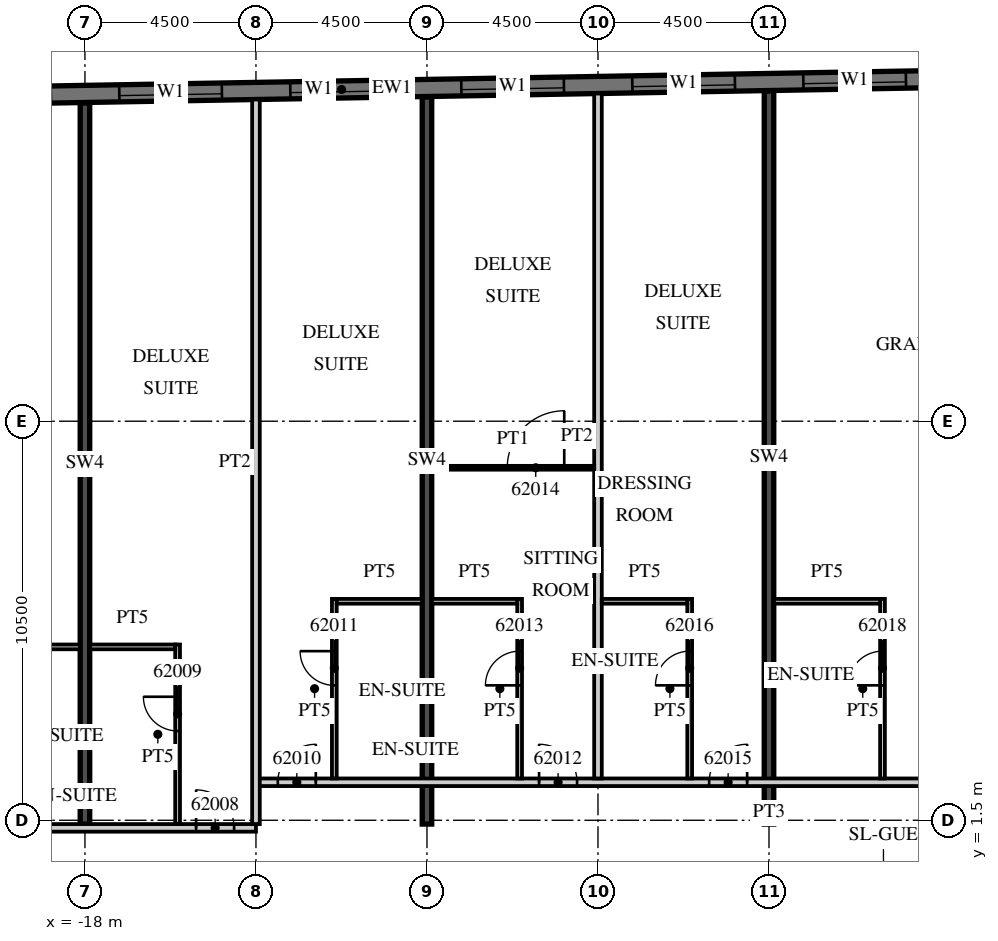
"""IFC4 building model, lengths in metres.
Left out: names, types, materials, properties, quantities, classifications, styles, units other than length and angle.
Written with IfcOpenShell. Run it as: python <this file> out.ifc"""

import sys

from ifc_helpers import new_model, si_unit, direction, frame, frame_2d, origin, place, context, subcontext, project, spatial, rectangle, extrude, element, fill, save


model = new_model("IFC4")
c1 = context("Model", 3, precision=1e-05, world=origin(), true_north=direction((0.0, 1.0)))
c2 = subcontext(c1, "Body", "Model", "MODEL_VIEW")
j1 = project(units=[si_unit("LENGTHUNIT", "METRE"), si_unit("PLANEANGLEUNIT", "RADIAN")], contexts=[c1])
p1 = place(None, origin())
s1 = spatial("IfcSite", under=j1, at=p1, CompositionType="ELEMENT")
p2 = place(p1, origin())
s2 = spatial("IfcBuilding", under=s1, at=p2, CompositionType="ELEMENT")
p3 = place(p2, frame((0.0, 0.0, 250.7)))
s3 = spatial("IfcBuildingStorey", under=s2, at=p3, CompositionType="ELEMENT", Elevation=250.7)
p4 = place(p3, frame((-18.0, 1.4, 0.0), z_axis=(0.0, 0.0, 1.0), x_axis=(0.0, 1.0, 0.0)))
e1 = element("IfcWall", 1, at=p4, inside=s3, PredefinedType="SHEAR", context=c2, shape_type="SweptSolid", body=[
    extrude(rectangle(XDim=18.974, YDim=0.25, at=frame_2d((9.487, 0.0))), origin(), (0.0, 0.0, 1.0), 3.3),
])
p5 = place(p3, frame((-9.0, 1.4, 0.0), z_axis=(0.0, 0.0, 1.0), x_axis=(0.0, 1.0, 0.0)))
e2 = element("IfcWall", 2, at=p5, inside=s3, PredefinedType="SHEAR", context=c2, shape_type="SweptSolid", body=[
    extrude(rectangle(XDim=19.132, YDim=0.25, at=frame_2d((9.566, 0.0))), origin(), (0.0, 0.0, 1.0), 3.3),
])
p6 = place(p3, frame((0.0, 1.4, 0.0), z_axis=(0.0, 0.0, 1.0), x_axis=(0.0, 1.0, 0.0)))
e3 = element("IfcWall", 3, at=p6, inside=s3, PredefinedType="SHEAR", context=c2, shape_type="SweptSolid", body=[
    extrude(rectangle(XDim=19.289, YDim=0.25, at=frame_2d((9.644, 0.0))), origin(), (0.0, 0.0, 1.0), 3.3),
])
p7 = place(p3, frame((13.504, 21.161, 0.0), z_axis=(0.0, 0.0, 1.0), x_axis=(-0.999847763257, -0.017448504532, 0.0)))
e4 = element("IfcWall", 4, at=p7, inside=s3, PredefinedType="SOLIDWALL", context=c2, shape_type="SweptSolid", body=[
    extrude(rectangle(XDim=46.859, YDim=0.45, at=frame_2d((23.43, 0.0))), origin(), (0.0, 0.0, 1.0), 3.02),
])
p8 = place(p7, frame((0.9, 0.0, 0.45)))
e5 = element("IfcOpeningElement", 5, at=p8, cuts=e4, PredefinedType="OPENING", context=c2, shape_type="SweptSolid", body=[
    extrude(rectangle(XDim=2.7, YDim=2.25, at=frame_2d((1.35, 1.125))), frame((0.0, 0.235, 0.0), z_axis=(0.0, -1.0, 0.0), x_axis=(1.0, 0.0, 0.0)), (0.0, 0.0, 1.0), 0.47),
])
p9 = place(p7, frame((5.401, 0.0, 0.45)))
e6 = element("IfcOpeningElement", 6, at=p9, cuts=e4, PredefinedType="OPENING", context=c2, shape_type="SweptSolid", body=[
    extrude(rectangle(XDim=2.7, YDim=2.25, at=frame_2d((1.35, 1.125))), frame((0.0, 0.235, 0.0), z_axis=(0.0, -1.0, 0.0), x_axis=(1.0, 0.0, 0.0)), (0.0, 0.0, 1.0), 0.47),
])
p10 = place(p7, frame((9.902, 0.0, 0.45)))
e7 = element("IfcOpeningElement", 7, at=p10, cuts=e4, PredefinedType="OPENING", context=c2, shape_type="SweptSolid", body=[
    extrude(rectangle(XDim=2.7, YDim=2.25, at=frame_2d((1.35, 1.125))), frame((0.0, 0.235, 0.0), z_axis=(0.0, -1.0, 0.0), x_axis=(1.0, 0.0, 0.0)), (0.0, 0.0, 1.0), 0.47),
])
p11 = place(p7, frame((14.402, 0.0, 0.45)))
e8 = element("IfcOpeningElement", 8, at=p11, cuts=e4, PredefinedType="OPENING", context=c2, shape_type="SweptSolid", body=[
    extrude(rectangle(XDim=2.7, YDim=2.25, at=frame_2d((1.35, 1.125))), frame((0.0, 0.235, 0.0), z_axis=(0.0, -1.0, 0.0), x_axis=(1.0, 0.0, 0.0)), (0.0, 0.0, 1.0), 0.47),
])
p12 = place(p7, frame((18.903, 0.0, 0.45)))
e9 = element("IfcOpeningElement", 9, at=p12, cuts=e4, PredefinedType="OPENING", context=c2, shape_type="SweptSolid", body=[
    extrude(rectangle(XDim=2.7, YDim=2.25, at=frame_2d((1.35, 1.125))), frame((0.0, 0.235, 0.0), z_axis=(0.0, -1.0, 0.0), x_axis=(1.0, 0.0, 0.0)), (0.0, 0.0, 1.0), 0.47),
])
p13 = place(p7, frame((23.404, 0.0, 0.45)))
e10 = element("IfcOpeningElement", 10, at=p13, cuts=e4, PredefinedType="OPENING", context=c2, shape_type="SweptSolid", body=[
    extrude(rectangle(XDim=2.7, YDim=2.25, at=frame_2d((1.35, 1.125))), frame((0.0, 0.235, 0.0), z_axis=(0.0, -1.0, 0.0), x_axis=(1.0, 0.0, 0.0)), (0.0, 0.0, 1.0), 0.47),
])
p14 = place(p7, frame((27.904, 0.0, 0.45)))
e11 = element("IfcOpeningElement", 11, at=p14, cuts=e4, PredefinedType="OPENING", context=c2, shape_type="SweptSolid", body=[
    extrude(rectangle(XDim=2.7, YDim=2.25, at=frame_2d((1.35, 1.125))), frame((0.0, 0.235, 0.0), z_axis=(0.0, -1.0, 0.0), x_axis=(1.0, 0.0, 0.0)), (0.0, 0.0, 1.0), 0.47),
])
p15 = place(p7, frame((32.405, 0.0, 0.45)))
e12 = element("IfcOpeningElement", 12, at=p15, cuts=e4, PredefinedType="OPENING", context=c2, shape_type="SweptSolid", body=[
    extrude(rectangle(XDim=2.7, YDim=2.25, at=frame_2d((1.35, 1.125))), frame((0.0, 0.235, 0.0), z_axis=(0.0, -1.0, 0.0), x_axis=(1.0, 0.0, 0.0)), (0.0, 0.0, 1.0), 0.47),
])
p16 = place(p7, frame((36.906, 0.0, 0.45)))
e13 = element("IfcOpeningElement", 13, at=p16, cuts=e4, PredefinedType="OPENING", context=c2, shape_type="SweptSolid", body=[
    extrude(rectangle(XDim=2.7, YDim=2.25, at=frame_2d((1.35, 1.125))), frame((0.0, 0.235, 0.0), z_axis=(0.0, -1.0, 0.0), x_axis=(1.0, 0.0, 0.0)), (0.0, 0.0, 1.0), 0.47),
])
p17 = place(p7, frame((41.406, 0.0, 0.45)))
e14 = element("IfcOpeningElement", 14, at=p17, cuts=e4, PredefinedType="OPENING", context=c2, shape_type="SweptSolid", body=[
    extrude(rectangle(XDim=2.7, YDim=2.25, at=frame_2d((1.35, 1.125))), frame((0.0, 0.235, 0.0), z_axis=(0.0, -1.0, 0.0), x_axis=(1.0, 0.0, 0.0)), (0.0, 0.0, 1.0), 0.47),
])
p18 = place(p3, frame((-36.566, 1.3, 0.0), z_axis=(0.0, 0.0, 1.0), x_axis=(1.0, 0.0, 0.0)))
e15 = element("IfcWall", 15, at=p18, inside=s3, PredefinedType="PARTITIONING", context=c2, shape_type="SweptSolid", body=[
    extrude(rectangle(XDim=23.066, YDim=0.2, at=frame_2d((11.533, 0.0))), origin(), (0.0, 0.0, 1.0), 3.02),
])
p19 = place(p18, frame((5.929, 0.0, 0.0)))
e16 = element("IfcOpeningElement", 16, at=p19, cuts=e15, PredefinedType="OPENING", context=c2, shape_type="SweptSolid", body=[
    extrude(rectangle(XDim=1.2, YDim=2.1, at=frame_2d((0.6, 1.05))), frame((0.0, 0.11, 0.0), z_axis=(0.0, -1.0, 0.0), x_axis=(1.0, 0.0, 0.0)), (0.0, 0.0, 1.0), 0.22),
])
p20 = place(p18, frame((12.516, 0.0, 0.0)))
e17 = element("IfcOpeningElement", 17, at=p20, cuts=e15, PredefinedType="OPENING", context=c2, shape_type="SweptSolid", body=[
    extrude(rectangle(XDim=1.0, YDim=2.1, at=frame_2d((0.5, 1.05))), frame((0.0, 0.11, 0.0), z_axis=(0.0, -1.0, 0.0), x_axis=(1.0, 0.0, 0.0)), (0.0, 0.0, 1.0), 0.22),
])
p21 = place(p18, frame((14.616, 0.0, 0.0)))
e18 = element("IfcOpeningElement", 18, at=p21, cuts=e15, PredefinedType="OPENING", context=c2, shape_type="SweptSolid", body=[
    extrude(rectangle(XDim=1.0, YDim=2.1, at=frame_2d((0.5, 1.05))), frame((0.0, 0.11, 0.0), z_axis=(0.0, -1.0, 0.0), x_axis=(1.0, 0.0, 0.0)), (0.0, 0.0, 1.0), 0.22),
])
p22 = place(p18, frame((21.491, 0.0, 0.0)))
e19 = element("IfcOpeningElement", 19, at=p22, cuts=e15, PredefinedType="OPENING", context=c2, shape_type="SweptSolid", body=[
    extrude(rectangle(XDim=1.0, YDim=2.1, at=frame_2d((0.5, 1.05))), frame((0.0, 0.11, 0.0), z_axis=(0.0, -1.0, 0.0), x_axis=(1.0, 0.0, 0.0)), (0.0, 0.0, 1.0), 0.22),
])
p23 = place(p3, frame((-13.5, 2.5, 0.0), z_axis=(0.0, 0.0, 1.0), x_axis=(1.0, 0.0, 0.0)))
e20 = element("IfcWall", 20, at=p23, inside=s3, PredefinedType="PARTITIONING", context=c2, shape_type="SweptSolid", body=[
    extrude(rectangle(XDim=27.0, YDim=0.2, at=frame_2d((13.5, 0.0))), origin(), (0.0, 0.0, 1.0), 3.02),
])
p24 = place(p23, frame((0.575, 0.0, 0.0)))
e21 = element("IfcOpeningElement", 21, at=p24, cuts=e20, PredefinedType="OPENING", context=c2, shape_type="SweptSolid", body=[
    extrude(rectangle(XDim=1.0, YDim=2.1, at=frame_2d((0.5, 1.05))), frame((0.0, 0.11, 0.0), z_axis=(0.0, -1.0, 0.0), x_axis=(1.0, 0.0, 0.0)), (0.0, 0.0, 1.0), 0.22),
])
p25 = place(p23, frame((7.45, 0.0, 0.0)))
e22 = element("IfcOpeningElement", 22, at=p25, cuts=e20, PredefinedType="OPENING", context=c2, shape_type="SweptSolid", body=[
    extrude(rectangle(XDim=1.0, YDim=2.1, at=frame_2d((0.5, 1.05))), frame((0.0, 0.11, 0.0), z_axis=(0.0, -1.0, 0.0), x_axis=(1.0, 0.0, 0.0)), (0.0, 0.0, 1.0), 0.22),
])
p26 = place(p23, frame((11.925, 0.0, 0.0)))
e23 = element("IfcOpeningElement", 23, at=p26, cuts=e20, PredefinedType="OPENING", context=c2, shape_type="SweptSolid", body=[
    extrude(rectangle(XDim=1.0, YDim=2.1, at=frame_2d((0.5, 1.05))), frame((0.0, 0.11, 0.0), z_axis=(0.0, -1.0, 0.0), x_axis=(1.0, 0.0, 0.0)), (0.0, 0.0, 1.0), 0.22),
])
p27 = place(p23, frame((18.862, 0.0, 0.0)))
e24 = element("IfcOpeningElement", 24, at=p27, cuts=e20, PredefinedType="OPENING", context=c2, shape_type="SweptSolid", body=[
    extrude(rectangle(XDim=1.2, YDim=2.1, at=frame_2d((0.6, 1.05))), frame((0.0, 0.11, 0.0), z_axis=(0.0, -1.0, 0.0), x_axis=(1.0, 0.0, 0.0)), (0.0, 0.0, 1.0), 0.22),
])
p28 = place(p23, frame((23.075, 0.0, 0.0)))
e25 = element("IfcOpeningElement", 25, at=p28, cuts=e20, PredefinedType="OPENING", context=c2, shape_type="SweptSolid", body=[
    extrude(rectangle(XDim=1.0, YDim=2.1, at=frame_2d((0.5, 1.05))), frame((0.0, 0.11, 0.0), z_axis=(0.0, -1.0, 0.0), x_axis=(1.0, 0.0, 0.0)), (0.0, 0.0, 1.0), 0.22),
])
p29 = place(p3, frame((-20.375, 6.062, 0.0), z_axis=(0.0, 0.0, 1.0), x_axis=(1.0, 0.0, 0.0)))
e26 = element("IfcWall", 26, at=p29, inside=s3, PredefinedType="PARTITIONING", context=c2, shape_type="SweptSolid", body=[
    extrude(rectangle(XDim=2.25, YDim=0.125, at=frame_2d((1.125, 0.0))), origin(), (0.0, 0.0, 1.0), 3.02),
])
p30 = place(p3, frame((-13.5, 1.4, 0.0), z_axis=(0.0, 0.0, 1.0), x_axis=(0.0, 1.0, 0.0)))
e27 = element("IfcWall", 27, at=p30, inside=s3, PredefinedType="PARTITIONING", context=c2, shape_type="SweptSolid", body=[
    extrude(rectangle(XDim=19.065, YDim=0.2, at=frame_2d((9.533, 0.0))), origin(), (0.0, 0.0, 1.0), 3.02),
])
p31 = place(p3, frame((-15.562, 1.4, 0.0), z_axis=(0.0, 0.0, 1.0), x_axis=(0.0, 1.0, 0.0)))
e28 = element("IfcWall", 28, at=p31, inside=s3, PredefinedType="PARTITIONING", context=c2, shape_type="SweptSolid", body=[
    extrude(rectangle(XDim=4.725, YDim=0.125, at=frame_2d((2.363, 0.0))), origin(), (0.0, 0.0, 1.0), 3.02),
])
p32 = place(p31, frame((2.45, 0.0, 0.0)))
e29 = element("IfcOpeningElement", 29, at=p32, cuts=e28, PredefinedType="OPENING", context=c2, shape_type="SweptSolid", body=[
    extrude(rectangle(XDim=0.9, YDim=2.1, at=frame_2d((0.45, 1.05))), frame((0.0, 0.073, 0.0), z_axis=(0.0, -1.0, 0.0), x_axis=(1.0, 0.0, 0.0)), (0.0, 0.0, 1.0), 0.145),
])
p33 = place(p3, frame((-17.875, 6.062, 0.0), z_axis=(0.0, 0.0, 1.0), x_axis=(1.0, 0.0, 0.0)))
e30 = element("IfcWall", 30, at=p33, inside=s3, PredefinedType="PARTITIONING", context=c2, shape_type="SweptSolid", body=[
    extrude(rectangle(XDim=2.25, YDim=0.125, at=frame_2d((1.125, 0.0))), origin(), (0.0, 0.0, 1.0), 3.02),
])
p34 = place(p3, frame((-11.438, 2.6, 0.0), z_axis=(0.0, 0.0, 1.0), x_axis=(0.0, 1.0, 0.0)))
e31 = element("IfcWall", 31, at=p34, inside=s3, PredefinedType="PARTITIONING", context=c2, shape_type="SweptSolid", body=[
    extrude(rectangle(XDim=4.725, YDim=0.125, at=frame_2d((2.362, 0.0))), origin(), (0.0, 0.0, 1.0), 3.02),
])
p35 = place(p34, frame((2.45, 0.0, 0.0)))
e32 = element("IfcOpeningElement", 32, at=p35, cuts=e31, PredefinedType="OPENING", context=c2, shape_type="SweptSolid", body=[
    extrude(rectangle(XDim=0.9, YDim=2.1, at=frame_2d((0.45, 1.05))), frame((0.0, 0.073, 0.0), z_axis=(0.0, -1.0, 0.0), x_axis=(1.0, 0.0, 0.0)), (0.0, 0.0, 1.0), 0.145),
])
p36 = place(p3, frame((-11.375, 7.262, 0.0), z_axis=(0.0, 0.0, 1.0), x_axis=(1.0, 0.0, 0.0)))
e33 = element("IfcWall", 33, at=p36, inside=s3, PredefinedType="PARTITIONING", context=c2, shape_type="SweptSolid", body=[
    extrude(rectangle(XDim=2.25, YDim=0.125, at=frame_2d((1.125, 0.0))), origin(), (0.0, 0.0, 1.0), 3.02),
])
p37 = place(p3, frame((-4.5, 2.6, 0.0), z_axis=(0.0, 0.0, 1.0), x_axis=(0.0, 1.0, 0.0)))
e34 = element("IfcWall", 34, at=p37, inside=s3, PredefinedType="PARTITIONING", context=c2, shape_type="SweptSolid", body=[
    extrude(rectangle(XDim=18.022, YDim=0.2, at=frame_2d((9.011, 0.0))), origin(), (0.0, 0.0, 1.0), 3.02),
])
p38 = place(p3, frame((-6.562, 2.6, 0.0), z_axis=(0.0, 0.0, 1.0), x_axis=(0.0, 1.0, 0.0)))
e35 = element("IfcWall", 35, at=p38, inside=s3, PredefinedType="PARTITIONING", context=c2, shape_type="SweptSolid", body=[
    extrude(rectangle(XDim=4.725, YDim=0.125, at=frame_2d((2.362, 0.0))), origin(), (0.0, 0.0, 1.0), 3.02),
])
p39 = place(p38, frame((2.45, 0.0, 0.0)))
e36 = element("IfcOpeningElement", 36, at=p39, cuts=e35, PredefinedType="OPENING", context=c2, shape_type="SweptSolid", body=[
    extrude(rectangle(XDim=0.9, YDim=2.1, at=frame_2d((0.45, 1.05))), frame((0.0, 0.073, 0.0), z_axis=(0.0, -1.0, 0.0), x_axis=(1.0, 0.0, 0.0)), (0.0, 0.0, 1.0), 0.145),
])
p40 = place(p3, frame((-8.875, 7.262, 0.0), z_axis=(0.0, 0.0, 1.0), x_axis=(1.0, 0.0, 0.0)))
e37 = element("IfcWall", 37, at=p40, inside=s3, PredefinedType="PARTITIONING", context=c2, shape_type="SweptSolid", body=[
    extrude(rectangle(XDim=2.25, YDim=0.125, at=frame_2d((1.125, 0.0))), origin(), (0.0, 0.0, 1.0), 3.02),
])
p41 = place(p3, frame((-8.875, 10.775, 0.0), z_axis=(0.0, 0.0, 1.0), x_axis=(1.0, 0.0, 0.0)))
e38 = element("IfcWall", 38, at=p41, inside=s3, PredefinedType="PARTITIONING", context=c2, shape_type="SweptSolid", body=[
    extrude(rectangle(XDim=4.275, YDim=0.1, at=frame_2d((2.137, 0.0))), origin(), (0.0, 0.0, 1.0), 3.02),
])
p42 = place(p41, frame((1.987, 0.0, 0.0)))
e39 = element("IfcOpeningElement", 39, at=p42, cuts=e38, PredefinedType="OPENING", context=c2, shape_type="SweptSolid", body=[
    extrude(rectangle(XDim=1.5, YDim=2.1, at=frame_2d((0.75, 1.05))), frame((0.0, 0.06, 0.0), z_axis=(0.0, -1.0, 0.0), x_axis=(1.0, 0.0, 0.0)), (0.0, 0.0, 1.0), 0.12),
])
p43 = place(p3, frame((-2.087, 2.6, 0.0), z_axis=(0.0, 0.0, 1.0), x_axis=(0.0, 1.0, 0.0)))
e40 = element("IfcWall", 40, at=p43, inside=s3, PredefinedType="PARTITIONING", context=c2, shape_type="SweptSolid", body=[
    extrude(rectangle(XDim=4.725, YDim=0.125, at=frame_2d((2.362, 0.0))), origin(), (0.0, 0.0, 1.0), 3.02),
])
p44 = place(p43, frame((2.45, 0.0, 0.0)))
e41 = element("IfcOpeningElement", 41, at=p44, cuts=e40, PredefinedType="OPENING", context=c2, shape_type="SweptSolid", body=[
    extrude(rectangle(XDim=0.9, YDim=2.1, at=frame_2d((0.45, 1.05))), frame((0.0, 0.073, 0.0), z_axis=(0.0, -1.0, 0.0), x_axis=(1.0, 0.0, 0.0)), (0.0, 0.0, 1.0), 0.145),
])
p45 = place(p3, frame((-4.4, 7.262, 0.0), z_axis=(0.0, 0.0, 1.0), x_axis=(1.0, 0.0, 0.0)))
e42 = element("IfcWall", 42, at=p45, inside=s3, PredefinedType="PARTITIONING", context=c2, shape_type="SweptSolid", body=[
    extrude(rectangle(XDim=2.25, YDim=0.125, at=frame_2d((1.125, 0.0))), origin(), (0.0, 0.0, 1.0), 3.02),
])
p46 = place(p3, frame((2.987, 2.6, 0.0), z_axis=(0.0, 0.0, 1.0), x_axis=(0.0, 1.0, 0.0)))
e43 = element("IfcWall", 43, at=p46, inside=s3, PredefinedType="PARTITIONING", context=c2, shape_type="SweptSolid", body=[
    extrude(rectangle(XDim=4.725, YDim=0.125, at=frame_2d((2.362, 0.0))), origin(), (0.0, 0.0, 1.0), 3.02),
])
p47 = place(p46, frame((2.45, 0.0, 0.0)))
e44 = element("IfcOpeningElement", 44, at=p47, cuts=e43, PredefinedType="OPENING", context=c2, shape_type="SweptSolid", body=[
    extrude(rectangle(XDim=0.9, YDim=2.1, at=frame_2d((0.45, 1.05))), frame((0.0, 0.073, 0.0), z_axis=(0.0, -1.0, 0.0), x_axis=(1.0, 0.0, 0.0)), (0.0, 0.0, 1.0), 0.145),
])
p48 = place(p3, frame((0.125, 7.262, 0.0), z_axis=(0.0, 0.0, 1.0), x_axis=(1.0, 0.0, 0.0)))
e45 = element("IfcWall", 45, at=p48, inside=s3, PredefinedType="PARTITIONING", context=c2, shape_type="SweptSolid", body=[
    extrude(rectangle(XDim=2.8, YDim=0.125, at=frame_2d((1.4, 0.0))), origin(), (0.0, 0.0, 1.0), 3.02),
])
p49 = place(p10, origin())
e46 = element("IfcWindow", 46, at=p49, inside=s3, PartitioningType="SINGLE_PANEL", PredefinedType="WINDOW", context=c2, shape_type="SweptSolid", body=[
    extrude(rectangle(XDim=2.7, YDim=2.25, at=frame_2d((1.35, 1.125))), frame((0.0, 0.09, 0.0), z_axis=(0.0, -1.0, 0.0), x_axis=(1.0, 0.0, 0.0)), (0.0, 0.0, 1.0), 0.06),
])
fill(e7, e46)
p50 = place(p11, origin())
e47 = element("IfcWindow", 47, at=p50, inside=s3, PartitioningType="SINGLE_PANEL", PredefinedType="WINDOW", context=c2, shape_type="SweptSolid", body=[
    extrude(rectangle(XDim=2.7, YDim=2.25, at=frame_2d((1.35, 1.125))), frame((0.0, 0.09, 0.0), z_axis=(0.0, -1.0, 0.0), x_axis=(1.0, 0.0, 0.0)), (0.0, 0.0, 1.0), 0.06),
])
fill(e8, e47)
p51 = place(p12, origin())
e48 = element("IfcWindow", 48, at=p51, inside=s3, PartitioningType="SINGLE_PANEL", PredefinedType="WINDOW", context=c2, shape_type="SweptSolid", body=[
    extrude(rectangle(XDim=2.7, YDim=2.25, at=frame_2d((1.35, 1.125))), frame((0.0, 0.09, 0.0), z_axis=(0.0, -1.0, 0.0), x_axis=(1.0, 0.0, 0.0)), (0.0, 0.0, 1.0), 0.06),
])
fill(e9, e48)
p52 = place(p13, origin())
e49 = element("IfcWindow", 49, at=p52, inside=s3, PartitioningType="SINGLE_PANEL", PredefinedType="WINDOW", context=c2, shape_type="SweptSolid", body=[
    extrude(rectangle(XDim=2.7, YDim=2.25, at=frame_2d((1.35, 1.125))), frame((0.0, 0.09, 0.0), z_axis=(0.0, -1.0, 0.0), x_axis=(1.0, 0.0, 0.0)), (0.0, 0.0, 1.0), 0.06),
])
fill(e10, e49)
p53 = place(p14, origin())
e50 = element("IfcWindow", 50, at=p53, inside=s3, PartitioningType="SINGLE_PANEL", PredefinedType="WINDOW", context=c2, shape_type="SweptSolid", body=[
    extrude(rectangle(XDim=2.7, YDim=2.25, at=frame_2d((1.35, 1.125))), frame((0.0, 0.09, 0.0), z_axis=(0.0, -1.0, 0.0), x_axis=(1.0, 0.0, 0.0)), (0.0, 0.0, 1.0), 0.06),
])
fill(e11, e50)
p54 = place(p22, origin())
e51 = element("IfcDoor", 51, at=p54, inside=s3, OperationType="SINGLE_SWING_LEFT", PredefinedType="DOOR", context=c2, shape_type="SweptSolid", body=[
    extrude(rectangle(XDim=1.0, YDim=2.1, at=frame_2d((0.5, 1.05))), frame((0.0, 0.025, 0.0), z_axis=(0.0, -1.0, 0.0), x_axis=(1.0, 0.0, 0.0)), (0.0, 0.0, 1.0), 0.05),
])
fill(e19, e51)
p55 = place(p32, origin())
e52 = element("IfcDoor", 52, at=p55, inside=s3, OperationType="SINGLE_SWING_RIGHT", PredefinedType="DOOR", context=c2, shape_type="SweptSolid", body=[
    extrude(rectangle(XDim=0.9, YDim=2.1, at=frame_2d((0.45, 1.05))), frame((0.0, 0.025, 0.0), z_axis=(0.0, -1.0, 0.0), x_axis=(1.0, 0.0, 0.0)), (0.0, 0.0, 1.0), 0.05),
])
fill(e29, e52)
p56 = place(p24, origin())
e53 = element("IfcDoor", 53, at=p56, inside=s3, OperationType="SINGLE_SWING_RIGHT", PredefinedType="DOOR", context=c2, shape_type="SweptSolid", body=[
    extrude(rectangle(XDim=1.0, YDim=2.1, at=frame_2d((0.5, 1.05))), frame((0.0, 0.025, 0.0), z_axis=(0.0, -1.0, 0.0), x_axis=(1.0, 0.0, 0.0)), (0.0, 0.0, 1.0), 0.05),
])
fill(e21, e53)
p57 = place(p35, origin())
e54 = element("IfcDoor", 54, at=p57, inside=s3, OperationType="SINGLE_SWING_RIGHT", PredefinedType="DOOR", context=c2, shape_type="SweptSolid", body=[
    extrude(rectangle(XDim=0.9, YDim=2.1, at=frame_2d((0.45, 1.05))), frame((0.0, 0.025, 0.0), z_axis=(0.0, -1.0, 0.0), x_axis=(1.0, 0.0, 0.0)), (0.0, 0.0, 1.0), 0.05),
])
fill(e32, e54)
p58 = place(p25, origin())
e55 = element("IfcDoor", 55, at=p58, inside=s3, OperationType="SINGLE_SWING_LEFT", PredefinedType="DOOR", context=c2, shape_type="SweptSolid", body=[
    extrude(rectangle(XDim=1.0, YDim=2.1, at=frame_2d((0.5, 1.05))), frame((0.0, 0.025, 0.0), z_axis=(0.0, -1.0, 0.0), x_axis=(1.0, 0.0, 0.0)), (0.0, 0.0, 1.0), 0.05),
])
fill(e22, e55)
p59 = place(p39, origin())
e56 = element("IfcDoor", 56, at=p59, inside=s3, OperationType="SINGLE_SWING_LEFT", PredefinedType="DOOR", context=c2, shape_type="SweptSolid", body=[
    extrude(rectangle(XDim=0.9, YDim=2.1, at=frame_2d((0.45, 1.05))), frame((0.0, 0.025, 0.0), z_axis=(0.0, -1.0, 0.0), x_axis=(1.0, 0.0, 0.0)), (0.0, 0.0, 1.0), 0.05),
])
fill(e36, e56)
p60 = place(p42, origin())
e57 = element("IfcDoor", 57, at=p60, inside=s3, OperationType="SINGLE_SWING_RIGHT", PredefinedType="DOOR", context=c2, shape_type="SweptSolid", body=[
    extrude(rectangle(XDim=1.5, YDim=2.1, at=frame_2d((0.75, 1.05))), frame((0.0, 0.025, 0.0), z_axis=(0.0, -1.0, 0.0), x_axis=(1.0, 0.0, 0.0)), (0.0, 0.0, 1.0), 0.05),
])
fill(e39, e57)
p61 = place(p26, origin())
e58 = element("IfcDoor", 58, at=p61, inside=s3, OperationType="SINGLE_SWING_RIGHT", PredefinedType="DOOR", context=c2, shape_type="SweptSolid", body=[
    extrude(rectangle(XDim=1.0, YDim=2.1, at=frame_2d((0.5, 1.05))), frame((0.0, 0.025, 0.0), z_axis=(0.0, -1.0, 0.0), x_axis=(1.0, 0.0, 0.0)), (0.0, 0.0, 1.0), 0.05),
])
fill(e23, e58)
p62 = place(p44, origin())
e59 = element("IfcDoor", 59, at=p62, inside=s3, OperationType="SINGLE_SWING_LEFT", PredefinedType="DOOR", context=c2, shape_type="SweptSolid", body=[
    extrude(rectangle(XDim=0.9, YDim=2.1, at=frame_2d((0.45, 1.05))), frame((0.0, 0.025, 0.0), z_axis=(0.0, -1.0, 0.0), x_axis=(1.0, 0.0, 0.0)), (0.0, 0.0, 1.0), 0.05),
])
fill(e41, e59)
p63 = place(p47, origin())
e60 = element("IfcDoor", 60, at=p63, inside=s3, OperationType="SINGLE_SWING_LEFT", PredefinedType="DOOR", context=c2, shape_type="SweptSolid", body=[
    extrude(rectangle(XDim=0.9, YDim=2.1, at=frame_2d((0.45, 1.05))), frame((0.0, 0.025, 0.0), z_axis=(0.0, -1.0, 0.0), x_axis=(1.0, 0.0, 0.0)), (0.0, 0.0, 1.0), 0.05),
])
fill(e44, e60)
save(model, sys.argv[1])
